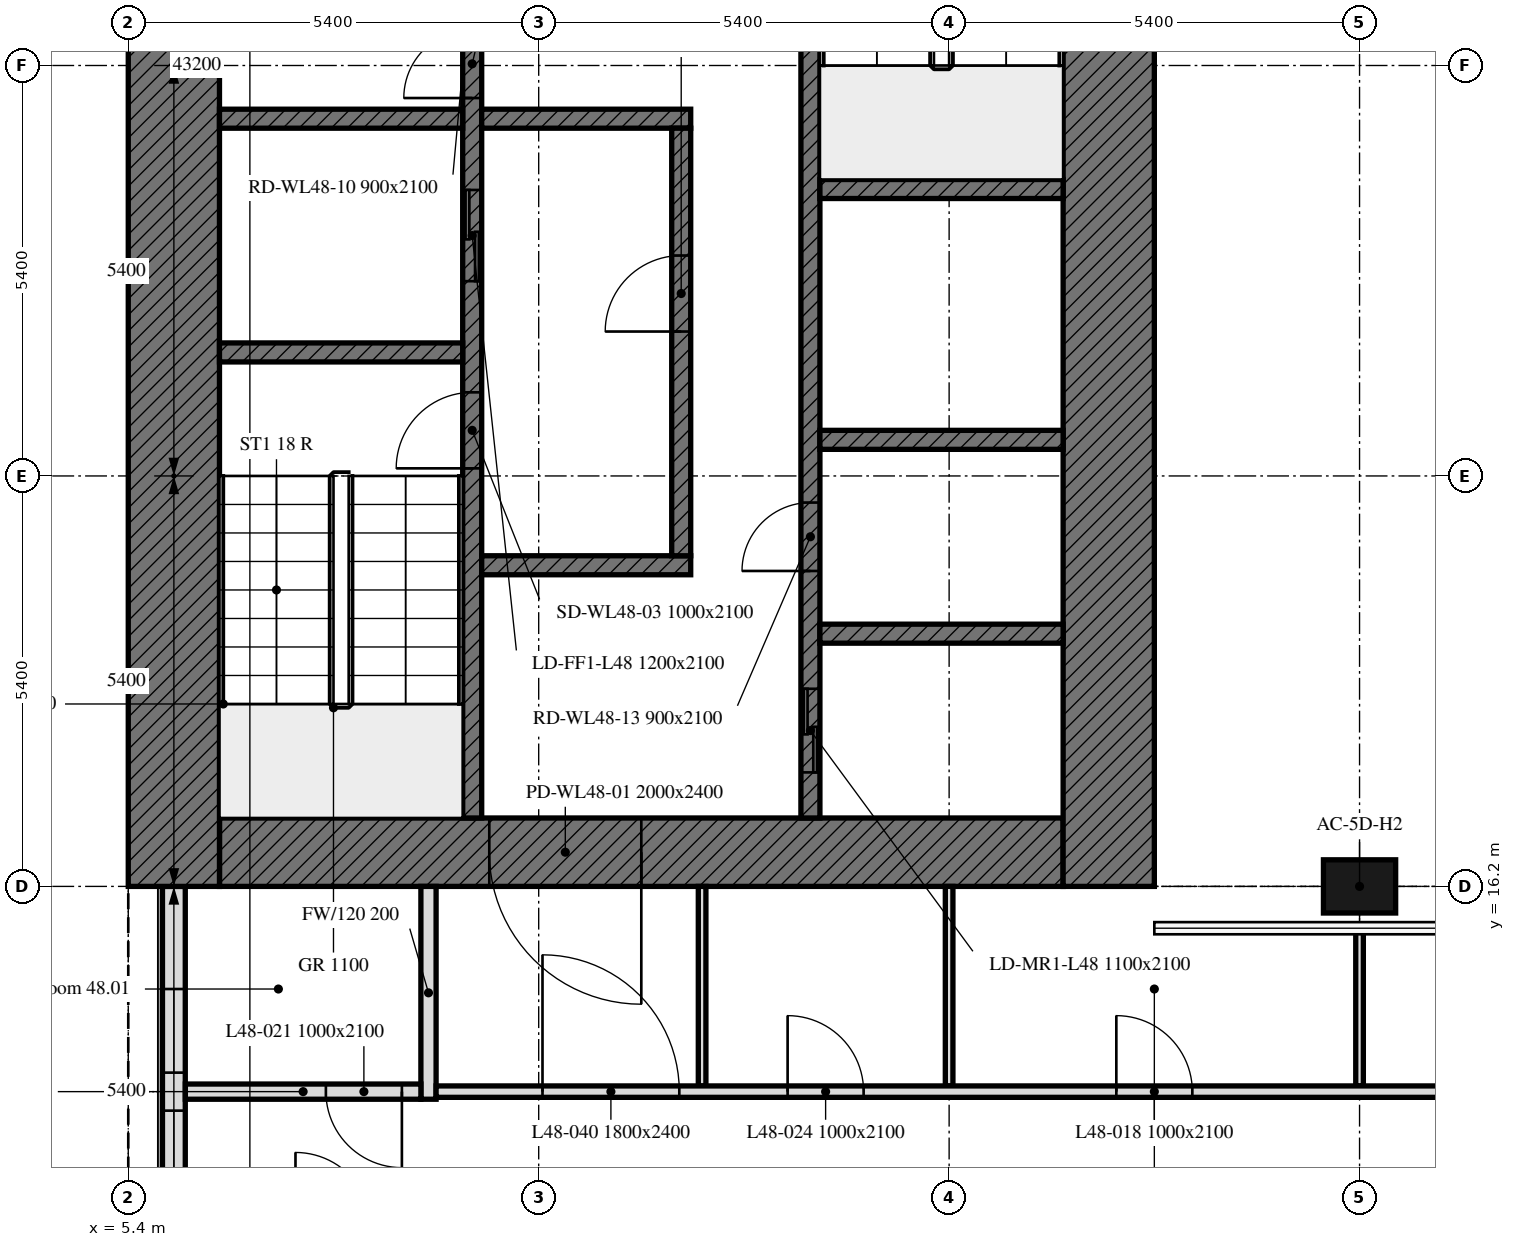
"""IFC4 building model, lengths in metres.
Left out: names, types, materials, properties, quantities, classifications, styles, units other than length and angle.
Written with IfcOpenShell. Run it as: python <this file> out.ifc"""

import sys

from ifc_helpers import new_model, si_unit, direction, frame, frame_2d, origin, origin_2d, place, context, subcontext, project, spatial, rectangle, extrude, element, fill, save


model = new_model("IFC4")
c1 = context("Model", 3, precision=1e-05, world=origin(), true_north=direction((0.0, 1.0)))
c2 = subcontext(c1, "Body", "Model", "MODEL_VIEW")
j1 = project(units=[si_unit("LENGTHUNIT", "METRE"), si_unit("PLANEANGLEUNIT", "RADIAN")], contexts=[c1])
p1 = place(None, origin())
s1 = spatial("IfcSite", under=j1, at=p1, CompositionType="ELEMENT")
p2 = place(p1, origin())
s2 = spatial("IfcBuilding", under=s1, at=p2, CompositionType="ELEMENT")
p3 = place(p2, frame((0.0, 0.0, 197.2)))
s3 = spatial("IfcBuildingStorey", under=s2, at=p3, CompositionType="ELEMENT", Elevation=197.2)
p4 = place(p3, frame((21.6, 16.2, 0.0), z_axis=(0.0, 0.0, 1.0), x_axis=(1.0, 0.0, 0.0)))
e1 = element("IfcColumn", 1, at=p4, inside=s3, PredefinedType="COLUMN", context=c2, shape_type="SweptSolid", body=[
    extrude(rectangle(XDim=0.95, YDim=0.7, at=origin_2d()), origin(), (0.0, 0.0, 1.0), 3.0),
])
p5 = place(p3, frame((6.0, 16.2, 0.0), z_axis=(0.0, 0.0, 1.0), x_axis=(0.0, -1.0, 0.0)))
e2 = element("IfcWall", 2, at=p5, inside=s3, PredefinedType="SOLIDWALL", context=c2, shape_type="SweptSolid", body=[
    extrude(rectangle(XDim=5.214, YDim=0.3, at=frame_2d((2.607, 0.0))), origin(), (0.0, 0.0, 1.0), 3.0),
])
p6 = place(p5, frame((1.35, 0.0, 0.9)))
e3 = element("IfcOpeningElement", 3, at=p6, cuts=e2, PredefinedType="OPENING", context=c2, shape_type="SweptSolid", body=[
    extrude(rectangle(XDim=1.1, YDim=1.7, at=frame_2d((0.55, 0.85))), frame((0.0, 0.16, 0.0), z_axis=(0.0, -1.0, 0.0), x_axis=(1.0, 0.0, 0.0)), (0.0, 0.0, 1.0), 0.32),
])
p7 = place(p5, frame((2.95, 0.0, 0.9)))
e4 = element("IfcOpeningElement", 4, at=p7, cuts=e2, PredefinedType="OPENING", context=c2, shape_type="SweptSolid", body=[
    extrude(rectangle(XDim=1.1, YDim=1.7, at=frame_2d((0.55, 0.85))), frame((0.0, 0.16, 0.0), z_axis=(0.0, -1.0, 0.0), x_axis=(1.0, 0.0, 0.0)), (0.0, 0.0, 1.0), 0.32),
])
p8 = place(p3, frame((17.7, 16.65, 0.0), z_axis=(0.0, 0.0, 1.0), x_axis=(-1.0, 0.0, 0.0)))
e5 = element("IfcWall", 5, at=p8, inside=s3, PredefinedType="SOLIDWALL", context=c2, shape_type="SweptSolid", body=[
    extrude(rectangle(XDim=11.1, YDim=0.9, at=frame_2d((5.55, 0.0))), origin(), (0.0, 0.0, 1.0), 3.0),
])
p9 = place(p8, frame((5.55, 0.0, 0.0)))
e6 = element("IfcOpeningElement", 6, at=p9, cuts=e5, PredefinedType="OPENING", context=c2, shape_type="SweptSolid", body=[
    extrude(rectangle(XDim=2.0, YDim=2.4, at=frame_2d((1.0, 1.2))), frame((0.0, 0.45, 0.0), z_axis=(0.0, -1.0, 0.0), x_axis=(1.0, 0.0, 0.0)), (0.0, 0.0, 1.0), 0.9),
])
for number, where, z_axis, x_axis in (
    (7, (6.0, 16.2, 0.0), (0.0, 0.0, 1.0), (0.0, 1.0, 0.0)),
    (8, (18.3, 32.4, 0.0), (0.0, 0.0, 1.0), (0.0, -1.0, 0.0)),
):
    element("IfcWall", number, at=place(p3, frame(where, z_axis=z_axis, x_axis=x_axis)), inside=s3, PredefinedType="SOLIDWALL", context=c2, shape_type="SweptSolid", body=[
        extrude(rectangle(XDim=16.2, YDim=1.2, at=frame_2d((8.1, 0.0))), origin(), (0.0, 0.0, 1.0), 3.0),
    ])
p10 = place(p3, frame((9.925, 17.1, 0.0), z_axis=(0.0, 0.0, 1.0), x_axis=(0.0, 1.0, 0.0)))
e9 = element("IfcWall", 9, at=p10, inside=s3, PredefinedType="SOLIDWALL", context=c2, shape_type="SweptSolid", body=[
    extrude(rectangle(XDim=14.4, YDim=0.25, at=frame_2d((7.2, 0.0))), origin(), (0.0, 0.0, 1.0), 3.0),
])
p11 = place(p10, frame((4.6, 0.0, 0.0)))
e10 = element("IfcOpeningElement", 10, at=p11, cuts=e9, PredefinedType="OPENING", context=c2, shape_type="SweptSolid", body=[
    extrude(rectangle(XDim=1.0, YDim=2.1, at=frame_2d((0.5, 1.05))), frame((0.0, 0.125, 0.0), z_axis=(0.0, -1.0, 0.0), x_axis=(1.0, 0.0, 0.0)), (0.0, 0.0, 1.0), 0.25),
])
p12 = place(p10, frame((7.062, 0.0, 0.0)))
e11 = element("IfcOpeningElement", 11, at=p12, cuts=e9, PredefinedType="OPENING", context=c2, shape_type="SweptSolid", body=[
    extrude(rectangle(XDim=1.2, YDim=2.1, at=frame_2d((0.6, 1.05))), frame((0.0, 0.125, 0.0), z_axis=(0.0, -1.0, 0.0), x_axis=(1.0, 0.0, 0.0)), (0.0, 0.0, 1.0), 0.25),
])
p13 = place(p10, frame((9.472, 0.0, 0.0)))
e12 = element("IfcOpeningElement", 12, at=p13, cuts=e9, PredefinedType="OPENING", context=c2, shape_type="SweptSolid", body=[
    extrude(rectangle(XDim=0.9, YDim=2.1, at=frame_2d((0.45, 1.05))), frame((0.0, 0.125, 0.0), z_axis=(0.0, -1.0, 0.0), x_axis=(1.0, 0.0, 0.0)), (0.0, 0.0, 1.0), 0.25),
])
p14 = place(p10, frame((10.779, 0.0, 0.0)))
e13 = element("IfcOpeningElement", 13, at=p14, cuts=e9, PredefinedType="OPENING", context=c2, shape_type="SweptSolid", body=[
    extrude(rectangle(XDim=0.9, YDim=2.1, at=frame_2d((0.45, 1.05))), frame((0.0, 0.125, 0.0), z_axis=(0.0, -1.0, 0.0), x_axis=(1.0, 0.0, 0.0)), (0.0, 0.0, 1.0), 0.25),
])
p15 = place(p10, frame((12.048, 0.0, 0.0)))
e14 = element("IfcOpeningElement", 14, at=p15, cuts=e9, PredefinedType="OPENING", context=c2, shape_type="SweptSolid", body=[
    extrude(rectangle(XDim=0.9, YDim=2.1, at=frame_2d((0.45, 1.05))), frame((0.0, 0.125, 0.0), z_axis=(0.0, -1.0, 0.0), x_axis=(1.0, 0.0, 0.0)), (0.0, 0.0, 1.0), 0.25),
])
p16 = place(p10, frame((13.354, 0.0, 0.0)))
e15 = element("IfcOpeningElement", 15, at=p16, cuts=e9, PredefinedType="OPENING", context=c2, shape_type="SweptSolid", body=[
    extrude(rectangle(XDim=0.9, YDim=2.1, at=frame_2d((0.45, 1.05))), frame((0.0, 0.125, 0.0), z_axis=(0.0, -1.0, 0.0), x_axis=(1.0, 0.0, 0.0)), (0.0, 0.0, 1.0), 0.25),
])
p17 = place(p3, frame((14.375, 17.1, 0.0), z_axis=(0.0, 0.0, 1.0), x_axis=(0.0, 1.0, 0.0)))
e16 = element("IfcWall", 16, at=p17, inside=s3, PredefinedType="SOLIDWALL", context=c2, shape_type="SweptSolid", body=[
    extrude(rectangle(XDim=14.4, YDim=0.25, at=frame_2d((7.2, 0.0))), origin(), (0.0, 0.0, 1.0), 3.0),
])
p18 = place(p17, frame((13.15, 0.0, 0.0)))
e17 = element("IfcOpeningElement", 17, at=p18, cuts=e16, PredefinedType="OPENING", context=c2, shape_type="SweptSolid", body=[
    extrude(rectangle(XDim=1.0, YDim=2.1, at=frame_2d((0.5, 1.05))), frame((0.0, 0.125, 0.0), z_axis=(0.0, -1.0, 0.0), x_axis=(1.0, 0.0, 0.0)), (0.0, 0.0, 1.0), 0.25),
])
p19 = place(p17, frame((0.6, 0.0, 0.0)))
e18 = element("IfcOpeningElement", 18, at=p19, cuts=e16, PredefinedType="OPENING", context=c2, shape_type="SweptSolid", body=[
    extrude(rectangle(XDim=1.1, YDim=2.1, at=frame_2d((0.55, 1.05))), frame((0.0, 0.125, 0.0), z_axis=(0.0, -1.0, 0.0), x_axis=(1.0, 0.0, 0.0)), (0.0, 0.0, 1.0), 0.25),
])
p20 = place(p17, frame((3.25, 0.0, 0.0)))
e19 = element("IfcOpeningElement", 19, at=p20, cuts=e16, PredefinedType="OPENING", context=c2, shape_type="SweptSolid", body=[
    extrude(rectangle(XDim=0.9, YDim=2.1, at=frame_2d((0.45, 1.05))), frame((0.0, 0.125, 0.0), z_axis=(0.0, -1.0, 0.0), x_axis=(1.0, 0.0, 0.0)), (0.0, 0.0, 1.0), 0.25),
])
for number, where, z_axis, x_axis in (
    (20, (6.6, 23.225, 0.0), (0.0, 0.0, 1.0), (1.0, 0.0, 0.0)),
    (21, (14.5, 25.375, 0.0), (0.0, 0.0, 1.0), (1.0, 0.0, 0.0)),
    (22, (14.5, 22.075, 0.0), (0.0, 0.0, 1.0), (1.0, 0.0, 0.0)),
    (23, (6.6, 26.3, 0.0), (0.0, 0.0, 1.0), (1.0, 0.0, 0.0)),
):
    element("IfcWall", number, at=place(p3, frame(where, z_axis=z_axis, x_axis=x_axis)), inside=s3, PredefinedType="SOLIDWALL", context=c2, shape_type="SweptSolid", body=[
        extrude(rectangle(XDim=3.2, YDim=0.25, at=frame_2d((1.6, 0.0))), origin(), (0.0, 0.0, 1.0), 3.0),
    ])
for number, where, z_axis, x_axis in (
    (24, (10.05, 26.3, 0.0), (0.0, 0.0, 1.0), (1.0, 0.0, 0.0)),
    (25, (10.05, 20.425, 0.0), (0.0, 0.0, 1.0), (1.0, 0.0, 0.0)),
):
    element("IfcWall", number, at=place(p3, frame(where, z_axis=z_axis, x_axis=x_axis)), inside=s3, PredefinedType="SOLIDWALL", context=c2, shape_type="SweptSolid", body=[
        extrude(rectangle(XDim=2.75, YDim=0.25, at=frame_2d((1.375, 0.0))), origin(), (0.0, 0.0, 1.0), 3.0),
    ])
p21 = place(p3, frame((12.675, 20.55, 0.0), z_axis=(0.0, 0.0, 1.0), x_axis=(0.0, 1.0, 0.0)))
e26 = element("IfcWall", 26, at=p21, inside=s3, PredefinedType="SOLIDWALL", context=c2, shape_type="SweptSolid", body=[
    extrude(rectangle(XDim=5.625, YDim=0.25, at=frame_2d((2.812, 0.0))), origin(), (0.0, 0.0, 1.0), 3.0),
])
p22 = place(p21, frame((2.95, 0.0, 0.0)))
e27 = element("IfcOpeningElement", 27, at=p22, cuts=e26, PredefinedType="OPENING", context=c2, shape_type="SweptSolid", body=[
    extrude(rectangle(XDim=1.0, YDim=2.1, at=frame_2d((0.5, 1.05))), frame((0.0, 0.125, 0.0), z_axis=(0.0, -1.0, 0.0), x_axis=(1.0, 0.0, 0.0)), (0.0, 0.0, 1.0), 0.25),
])
p23 = place(p3, frame((14.5, 19.525, 0.0), z_axis=(0.0, 0.0, 1.0), x_axis=(1.0, 0.0, 0.0)))
e28 = element("IfcWall", 28, at=p23, inside=s3, PredefinedType="SOLIDWALL", context=c2, shape_type="SweptSolid", body=[
    extrude(rectangle(XDim=3.2, YDim=0.25, at=frame_2d((1.6, 0.0))), origin(), (0.0, 0.0, 1.0), 3.0),
])
p24 = place(p3, frame((16.2, 16.2, 0.0), z_axis=(0.0, 0.0, 1.0), x_axis=(0.0, -1.0, 0.0)))
e29 = element("IfcWall", 29, at=p24, inside=s3, PredefinedType="PARTITIONING", context=c2, shape_type="SweptSolid", body=[
    extrude(rectangle(XDim=2.625, YDim=0.1, at=frame_2d((1.312, 0.0))), origin(), (0.0, 0.0, 1.0), 3.0),
])
p25 = place(p3, frame((21.6, 13.575, 0.0), z_axis=(0.0, 0.0, 1.0), x_axis=(0.0, 1.0, 0.0)))
e30 = element("IfcWall", 30, at=p25, inside=s3, PredefinedType="PARTITIONING", context=c2, shape_type="SweptSolid", body=[
    extrude(rectangle(XDim=2.13, YDim=0.1, at=frame_2d((1.065, 0.0))), origin(), (0.0, 0.0, 1.0), 3.0),
])
p26 = place(p3, frame((9.35, 16.2, 0.0), z_axis=(0.0, 0.0, 1.0), x_axis=(0.0, -1.0, 0.0)))
e31 = element("IfcWall", 31, at=p26, inside=s3, PredefinedType="PARTITIONING", context=c2, shape_type="SweptSolid", body=[
    extrude(rectangle(XDim=2.8, YDim=0.2, at=frame_2d((1.4, 0.0))), origin(), (0.0, 0.0, 1.0), 3.0),
])
p27 = place(p3, frame((12.95, 13.575, 0.0), z_axis=(0.0, 0.0, 1.0), x_axis=(0.0, 1.0, 0.0)))
e32 = element("IfcWall", 32, at=p27, inside=s3, PredefinedType="PARTITIONING", context=c2, shape_type="SweptSolid", body=[
    extrude(rectangle(XDim=2.625, YDim=0.1, at=frame_2d((1.312, 0.0))), origin(), (0.0, 0.0, 1.0), 3.0),
])
p28 = place(p3, frame((9.45, 13.5, 0.0), z_axis=(0.0, 0.0, 1.0), x_axis=(1.0, 0.0, 0.0)))
e33 = element("IfcWall", 33, at=p28, inside=s3, PredefinedType="PARTITIONING", context=c2, shape_type="SweptSolid", body=[
    extrude(rectangle(XDim=33.675, YDim=0.15, at=frame_2d((16.837, 0.0))), origin(), (0.0, 0.0, 1.0), 3.0),
])
p29 = place(p28, frame((8.95, 0.0, 0.0)))
e34 = element("IfcOpeningElement", 34, at=p29, cuts=e33, PredefinedType="OPENING", context=c2, shape_type="SweptSolid", body=[
    extrude(rectangle(XDim=1.0, YDim=2.1, at=frame_2d((0.5, 1.05))), frame((0.0, 0.075, 0.0), z_axis=(0.0, -1.0, 0.0), x_axis=(1.0, 0.0, 0.0)), (0.0, 0.0, 1.0), 0.15),
])
p30 = place(p28, frame((15.517, 0.0, 0.0)))
e35 = element("IfcOpeningElement", 35, at=p30, cuts=e33, PredefinedType="OPENING", context=c2, shape_type="SweptSolid", body=[
    extrude(rectangle(XDim=1.0, YDim=2.1, at=frame_2d((0.5, 1.05))), frame((0.0, 0.075, 0.0), z_axis=(0.0, -1.0, 0.0), x_axis=(1.0, 0.0, 0.0)), (0.0, 0.0, 1.0), 0.15),
])
p31 = place(p28, frame((24.075, 0.0, 0.0)))
e36 = element("IfcOpeningElement", 36, at=p31, cuts=e33, PredefinedType="OPENING", context=c2, shape_type="SweptSolid", body=[
    extrude(rectangle(XDim=1.0, YDim=2.1, at=frame_2d((0.5, 1.05))), frame((0.0, 0.075, 0.0), z_axis=(0.0, -1.0, 0.0), x_axis=(1.0, 0.0, 0.0)), (0.0, 0.0, 1.0), 0.15),
])
p32 = place(p28, frame((31.275, 0.0, 0.0)))
e37 = element("IfcOpeningElement", 37, at=p32, cuts=e33, PredefinedType="OPENING", context=c2, shape_type="SweptSolid", body=[
    extrude(rectangle(XDim=1.0, YDim=2.1, at=frame_2d((0.5, 1.05))), frame((0.0, 0.075, 0.0), z_axis=(0.0, -1.0, 0.0), x_axis=(1.0, 0.0, 0.0)), (0.0, 0.0, 1.0), 0.15),
])
p33 = place(p28, frame((4.625, 0.0, 0.0)))
e38 = element("IfcOpeningElement", 38, at=p33, cuts=e33, PredefinedType="OPENING", context=c2, shape_type="SweptSolid", body=[
    extrude(rectangle(XDim=1.0, YDim=2.1, at=frame_2d((0.5, 1.05))), frame((0.0, 0.075, 0.0), z_axis=(0.0, -1.0, 0.0), x_axis=(1.0, 0.0, 0.0)), (0.0, 0.0, 1.0), 0.15),
])
p34 = place(p28, frame((1.4, 0.0, 0.0)))
e39 = element("IfcOpeningElement", 39, at=p34, cuts=e33, PredefinedType="OPENING", context=c2, shape_type="SweptSolid", body=[
    extrude(rectangle(XDim=1.8, YDim=2.4, at=frame_2d((0.9, 1.2))), frame((0.0, 0.075, 0.0), z_axis=(0.0, -1.0, 0.0), x_axis=(1.0, 0.0, 0.0)), (0.0, 0.0, 1.0), 0.15),
])
p35 = place(p28, frame((26.5, 0.0, 0.0)))
e40 = element("IfcOpeningElement", 40, at=p35, cuts=e33, PredefinedType="OPENING", context=c2, shape_type="SweptSolid", body=[
    extrude(rectangle(XDim=1.8, YDim=2.4, at=frame_2d((0.9, 1.2))), frame((0.0, 0.075, 0.0), z_axis=(0.0, -1.0, 0.0), x_axis=(1.0, 0.0, 0.0)), (0.0, 0.0, 1.0), 0.15),
])
p36 = place(p3, frame((9.25, 13.5, 0.0), z_axis=(0.0, 0.0, 1.0), x_axis=(-1.0, 0.0, 0.0)))
e41 = element("IfcWall", 41, at=p36, inside=s3, PredefinedType="PARTITIONING", context=c2, shape_type="SweptSolid", body=[
    extrude(rectangle(XDim=3.099, YDim=0.2, at=frame_2d((1.55, 0.0))), origin(), (0.0, 0.0, 1.0), 3.0),
])
p37 = place(p36, frame((0.25, 0.0, 0.0)))
e42 = element("IfcOpeningElement", 42, at=p37, cuts=e41, PredefinedType="OPENING", context=c2, shape_type="SweptSolid", body=[
    extrude(rectangle(XDim=1.0, YDim=2.1, at=frame_2d((0.5, 1.05))), frame((0.0, 0.1, 0.0), z_axis=(0.0, -1.0, 0.0), x_axis=(1.0, 0.0, 0.0)), (0.0, 0.0, 1.0), 0.2),
])
p38 = place(p6, origin())
e43 = element("IfcWindow", 43, at=p38, inside=s3, PartitioningType="SINGLE_PANEL", PredefinedType="WINDOW", context=c2, shape_type="SweptSolid", body=[
    extrude(rectangle(XDim=1.1, YDim=1.7, at=frame_2d((0.55, 0.85))), frame((0.0, 0.03, 0.0), z_axis=(0.0, -1.0, 0.0), x_axis=(1.0, 0.0, 0.0)), (0.0, 0.0, 1.0), 0.06),
])
fill(e3, e43)
p39 = place(p7, origin())
e44 = element("IfcWindow", 44, at=p39, inside=s3, PartitioningType="SINGLE_PANEL", PredefinedType="WINDOW", context=c2, shape_type="SweptSolid", body=[
    extrude(rectangle(XDim=1.1, YDim=1.7, at=frame_2d((0.55, 0.85))), frame((0.0, 0.03, 0.0), z_axis=(0.0, -1.0, 0.0), x_axis=(1.0, 0.0, 0.0)), (0.0, 0.0, 1.0), 0.06),
])
fill(e4, e44)
p40 = place(p9, origin())
e45 = element("IfcDoor", 45, at=p40, inside=s3, OperationType="DOUBLE_DOOR_SINGLE_SWING", PredefinedType="DOOR", context=c2, shape_type="SweptSolid", body=[
    extrude(rectangle(XDim=2.0, YDim=2.4, at=frame_2d((1.0, 1.2))), frame((0.0, 0.025, 0.0), z_axis=(0.0, -1.0, 0.0), x_axis=(1.0, 0.0, 0.0)), (0.0, 0.0, 1.0), 0.05),
])
fill(e6, e45)
p41 = place(p11, origin())
e46 = element("IfcDoor", 46, at=p41, inside=s3, OperationType="SINGLE_SWING_LEFT", PredefinedType="DOOR", context=c2, shape_type="SweptSolid", body=[
    extrude(rectangle(XDim=1.0, YDim=2.1, at=frame_2d((0.5, 1.05))), frame((0.0, 0.025, 0.0), z_axis=(0.0, -1.0, 0.0), x_axis=(1.0, 0.0, 0.0)), (0.0, 0.0, 1.0), 0.05),
])
fill(e10, e46)
p42 = place(p22, origin())
e47 = element("IfcDoor", 47, at=p42, inside=s3, OperationType="SINGLE_SWING_LEFT", PredefinedType="DOOR", context=c2, shape_type="SweptSolid", body=[
    extrude(rectangle(XDim=1.0, YDim=2.1, at=frame_2d((0.5, 1.05))), frame((0.0, 0.025, 0.0), z_axis=(0.0, -1.0, 0.0), x_axis=(1.0, 0.0, 0.0)), (0.0, 0.0, 1.0), 0.05),
])
fill(e27, e47)
p43 = place(p12, origin())
e48 = element("IfcDoor", 48, at=p43, inside=s3, OperationType="DOUBLE_DOOR_SLIDING", PredefinedType="DOOR", context=c2, shape_type="SweptSolid", body=[
    extrude(rectangle(XDim=1.2, YDim=2.1, at=frame_2d((0.6, 1.05))), frame((0.0, 0.025, 0.0), z_axis=(0.0, -1.0, 0.0), x_axis=(1.0, 0.0, 0.0)), (0.0, 0.0, 1.0), 0.05),
])
fill(e11, e48)
p44 = place(p19, origin())
e49 = element("IfcDoor", 49, at=p44, inside=s3, OperationType="DOUBLE_DOOR_SLIDING", PredefinedType="DOOR", context=c2, shape_type="SweptSolid", body=[
    extrude(rectangle(XDim=1.1, YDim=2.1, at=frame_2d((0.55, 1.05))), frame((0.0, 0.025, 0.0), z_axis=(0.0, -1.0, 0.0), x_axis=(1.0, 0.0, 0.0)), (0.0, 0.0, 1.0), 0.05),
])
fill(e18, e49)
p45 = place(p13, origin())
e50 = element("IfcDoor", 50, at=p45, inside=s3, OperationType="SINGLE_SWING_LEFT", PredefinedType="DOOR", context=c2, shape_type="SweptSolid", body=[
    extrude(rectangle(XDim=0.9, YDim=2.1, at=frame_2d((0.45, 1.05))), frame((0.0, 0.025, 0.0), z_axis=(0.0, -1.0, 0.0), x_axis=(1.0, 0.0, 0.0)), (0.0, 0.0, 1.0), 0.05),
])
fill(e12, e50)
p46 = place(p20, origin())
e51 = element("IfcDoor", 51, at=p46, inside=s3, OperationType="SINGLE_SWING_LEFT", PredefinedType="DOOR", context=c2, shape_type="SweptSolid", body=[
    extrude(rectangle(XDim=0.9, YDim=2.1, at=frame_2d((0.45, 1.05))), frame((0.0, 0.025, 0.0), z_axis=(0.0, -1.0, 0.0), x_axis=(1.0, 0.0, 0.0)), (0.0, 0.0, 1.0), 0.05),
])
fill(e19, e51)
p47 = place(p29, origin())
e52 = element("IfcDoor", 52, at=p47, inside=s3, OperationType="SINGLE_SWING_LEFT", PredefinedType="DOOR", context=c2, shape_type="SweptSolid", body=[
    extrude(rectangle(XDim=1.0, YDim=2.1, at=frame_2d((0.5, 1.05))), frame((0.0, 0.025, 0.0), z_axis=(0.0, -1.0, 0.0), x_axis=(1.0, 0.0, 0.0)), (0.0, 0.0, 1.0), 0.05),
])
fill(e34, e52)
p48 = place(p37, origin())
e53 = element("IfcDoor", 53, at=p48, inside=s3, OperationType="SINGLE_SWING_RIGHT", PredefinedType="DOOR", context=c2, shape_type="SweptSolid", body=[
    extrude(rectangle(XDim=1.0, YDim=2.1, at=frame_2d((0.5, 1.05))), frame((0.0, 0.025, 0.0), z_axis=(0.0, -1.0, 0.0), x_axis=(1.0, 0.0, 0.0)), (0.0, 0.0, 1.0), 0.05),
])
fill(e42, e53)
p49 = place(p33, origin())
e54 = element("IfcDoor", 54, at=p49, inside=s3, OperationType="SINGLE_SWING_LEFT", PredefinedType="DOOR", context=c2, shape_type="SweptSolid", body=[
    extrude(rectangle(XDim=1.0, YDim=2.1, at=frame_2d((0.5, 1.05))), frame((0.0, 0.025, 0.0), z_axis=(0.0, -1.0, 0.0), x_axis=(1.0, 0.0, 0.0)), (0.0, 0.0, 1.0), 0.05),
])
fill(e38, e54)
p50 = place(p34, origin())
e55 = element("IfcDoor", 55, at=p50, inside=s3, OperationType="DOUBLE_DOOR_SINGLE_SWING", PredefinedType="DOOR", context=c2, shape_type="SweptSolid", body=[
    extrude(rectangle(XDim=1.8, YDim=2.4, at=frame_2d((0.9, 1.2))), frame((0.0, 0.025, 0.0), z_axis=(0.0, -1.0, 0.0), x_axis=(1.0, 0.0, 0.0)), (0.0, 0.0, 1.0), 0.05),
])
fill(e39, e55)
save(model, sys.argv[1])
